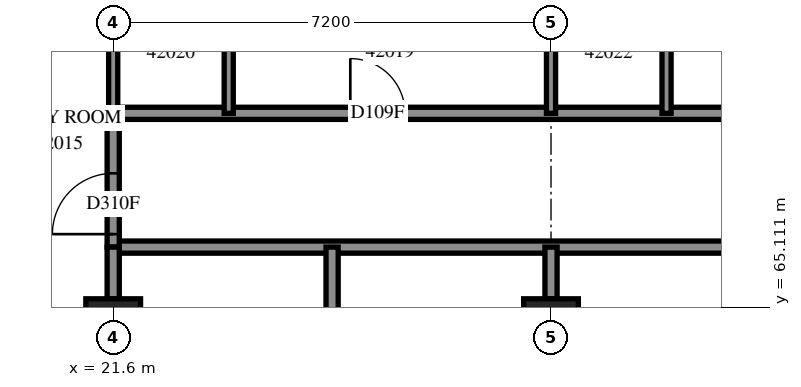
"""IFC4 building model, lengths in metres.
Left out: names, types, materials, properties, quantities, classifications, styles, units other than length and angle.
Written with IfcOpenShell. Run it as: python <this file> out.ifc"""

import sys

from ifc_helpers import new_model, si_unit, direction, frame, frame_2d, origin, origin_2d, place, context, subcontext, project, spatial, rectangle, extrude, element, fill, save


model = new_model("IFC4")
c1 = context("Model", 3, precision=1e-05, world=origin(), true_north=direction((0.0, 1.0)))
c2 = subcontext(c1, "Body", "Model", "MODEL_VIEW")
j1 = project(units=[si_unit("LENGTHUNIT", "METRE"), si_unit("PLANEANGLEUNIT", "RADIAN")], contexts=[c1])
p1 = place(None, origin())
s1 = spatial("IfcSite", under=j1, at=p1, CompositionType="ELEMENT")
p2 = place(p1, origin())
s2 = spatial("IfcBuilding", under=s1, at=p2, CompositionType="ELEMENT")
p3 = place(p2, frame((0.0, 0.0, 155.8)))
s3 = spatial("IfcBuildingStorey", under=s2, at=p3, CompositionType="ELEMENT", Elevation=155.8)
for number, where, z_axis, x_axis in (
    (1, (21.6, 64.8, 0.0), (0.0, 0.0, 1.0), (1.0, 0.0, 0.0)),
    (2, (28.8, 64.8, 0.0), (0.0, 0.0, 1.0), (1.0, 0.0, 0.0)),
):
    element("IfcColumn", number, at=place(p3, frame(where, z_axis=z_axis, x_axis=x_axis)), inside=s3, PredefinedType="COLUMN", context=c2, shape_type="SweptSolid", body=[
        extrude(rectangle(XDim=0.9, YDim=0.9, at=origin_2d()), origin(), (0.0, 0.0, 1.0), 3.1),
    ])
p4 = place(p3, frame((21.6, 68.3, 0.0), z_axis=(0.0, 0.0, 1.0), x_axis=(1.0, 0.0, 0.0)))
e3 = element("IfcWall", 3, at=p4, inside=s3, PredefinedType="PARTITIONING", context=c2, shape_type="SweptSolid", body=[
    extrude(rectangle(XDim=19.1, YDim=0.2, at=frame_2d((9.55, 0.0))), origin(), (0.0, 0.0, 1.0), 3.1),
])
p5 = place(p4, frame((3.899, 0.0, 0.0)))
e4 = element("IfcOpeningElement", 4, at=p5, cuts=e3, PredefinedType="OPENING", context=c2, shape_type="SweptSolid", body=[
    extrude(rectangle(XDim=0.9, YDim=2.1, at=frame_2d((0.45, 1.05))), frame((0.0, 0.11, 0.0), z_axis=(0.0, -1.0, 0.0), x_axis=(1.0, 0.0, 0.0)), (0.0, 0.0, 1.0), 0.22),
])
p6 = place(p4, frame((11.099, 0.0, 0.0)))
e5 = element("IfcOpeningElement", 5, at=p6, cuts=e3, PredefinedType="OPENING", context=c2, shape_type="SweptSolid", body=[
    extrude(rectangle(XDim=0.9, YDim=2.1, at=frame_2d((0.45, 1.05))), frame((0.0, 0.11, 0.0), z_axis=(0.0, -1.0, 0.0), x_axis=(1.0, 0.0, 0.0)), (0.0, 0.0, 1.0), 0.22),
])
p7 = place(p4, frame((16.7, 0.0, 0.0)))
e6 = element("IfcOpeningElement", 6, at=p7, cuts=e3, PredefinedType="OPENING", context=c2, shape_type="SweptSolid", body=[
    extrude(rectangle(XDim=0.9, YDim=2.1, at=frame_2d((0.45, 1.05))), frame((0.0, 0.11, 0.0), z_axis=(0.0, -1.0, 0.0), x_axis=(1.0, 0.0, 0.0)), (0.0, 0.0, 1.0), 0.22),
])
p8 = place(p3, frame((21.6, 66.1, 0.0), z_axis=(0.0, 0.0, 1.0), x_axis=(1.0, 0.0, 0.0)))
e7 = element("IfcWall", 7, at=p8, inside=s3, PredefinedType="PARTITIONING", context=c2, shape_type="SweptSolid", body=[
    extrude(rectangle(XDim=16.9, YDim=0.2, at=frame_2d((8.45, 0.0))), origin(), (0.0, 0.0, 1.0), 3.1),
])
p9 = place(p8, frame((12.493, 0.0, 0.0)))
e8 = element("IfcOpeningElement", 8, at=p9, cuts=e7, PredefinedType="OPENING", context=c2, shape_type="SweptSolid", body=[
    extrude(rectangle(XDim=1.0, YDim=2.1, at=frame_2d((0.5, 1.05))), frame((0.0, 0.11, 0.0), z_axis=(0.0, -1.0, 0.0), x_axis=(1.0, 0.0, 0.0)), (0.0, 0.0, 1.0), 0.22),
])
p10 = place(p3, frame((25.2, 63.018, 0.0), z_axis=(0.0, 0.0, 1.0), x_axis=(0.0, 1.0, 0.0)))
e9 = element("IfcWall", 9, at=p10, inside=s3, PredefinedType="PARTITIONING", context=c2, shape_type="SweptSolid", body=[
    extrude(rectangle(XDim=3.082, YDim=0.2, at=frame_2d((1.541, 0.0))), origin(), (0.0, 0.0, 1.0), 3.1),
])
p11 = place(p3, frame((21.6, 68.3, 0.0), z_axis=(0.0, 0.0, 1.0), x_axis=(0.0, 1.0, 0.0)))
e10 = element("IfcWall", 10, at=p11, inside=s3, PredefinedType="PARTITIONING", context=c2, shape_type="SweptSolid", body=[
    extrude(rectangle(XDim=2.4, YDim=0.15, at=frame_2d((1.2, 0.0))), origin(), (0.0, 0.0, 1.0), 2.6),
])
for number, where, z_axis, x_axis in (
    (11, (23.5, 68.3, 0.0), (0.0, 0.0, 1.0), (0.0, 1.0, 0.0)),
    (12, (28.8, 68.3, 0.0), (0.0, 0.0, 1.0), (0.0, 1.0, 0.0)),
    (13, (30.7, 68.3, 0.0), (0.0, 0.0, 1.0), (0.0, 1.0, 0.0)),
):
    element("IfcWall", number, at=place(p3, frame(where, z_axis=z_axis, x_axis=x_axis)), inside=s3, PredefinedType="PARTITIONING", context=c2, shape_type="SweptSolid", body=[
        extrude(rectangle(XDim=2.4, YDim=0.15, at=frame_2d((1.2, 0.0))), origin(), (0.0, 0.0, 1.0), 3.1),
    ])
p12 = place(p3, frame((21.6, 66.1, 0.0), z_axis=(0.0, 0.0, 1.0), x_axis=(0.0, 1.0, 0.0)))
e14 = element("IfcWall", 14, at=p12, inside=s3, PredefinedType="PARTITIONING", context=c2, shape_type="SweptSolid", body=[
    extrude(rectangle(XDim=2.2, YDim=0.2, at=frame_2d((1.1, 0.0))), origin(), (0.0, 0.0, 1.0), 2.6),
])
p13 = place(p12, frame((0.213, 0.0, 0.0)))
e15 = element("IfcOpeningElement", 15, at=p13, cuts=e14, PredefinedType="OPENING", context=c2, shape_type="SweptSolid", body=[
    extrude(rectangle(XDim=1.0, YDim=2.1, at=frame_2d((0.5, 1.05))), frame((0.0, 0.11, 0.0), z_axis=(0.0, -1.0, 0.0), x_axis=(1.0, 0.0, 0.0)), (0.0, 0.0, 1.0), 0.22),
])
p14 = place(p3, frame((21.6, 65.25, 0.0), z_axis=(0.0, 0.0, 1.0), x_axis=(0.0, 1.0, 0.0)))
e16 = element("IfcWall", 16, at=p14, inside=s3, PredefinedType="PARTITIONING", context=c2, shape_type="SweptSolid", body=[
    extrude(rectangle(XDim=0.85, YDim=0.2, at=frame_2d((0.425, 0.0))), origin(), (0.0, 0.0, 1.0), 2.6),
])
p15 = place(p3, frame((28.8, 65.25, 0.0), z_axis=(0.0, 0.0, 1.0), x_axis=(0.0, 1.0, 0.0)))
e17 = element("IfcWall", 17, at=p15, inside=s3, PredefinedType="PARTITIONING", context=c2, shape_type="SweptSolid", body=[
    extrude(rectangle(XDim=0.85, YDim=0.2, at=frame_2d((0.425, 0.0))), origin(), (0.0, 0.0, 1.0), 3.1),
])
p16 = place(p13, origin())
e18 = element("IfcDoor", 18, at=p16, inside=s3, OperationType="SINGLE_SWING_RIGHT", PredefinedType="DOOR", context=c2, shape_type="SweptSolid", body=[
    extrude(rectangle(XDim=1.0, YDim=2.1, at=frame_2d((0.5, 1.05))), frame((0.0, 0.025, 0.0), z_axis=(0.0, -1.0, 0.0), x_axis=(1.0, 0.0, 0.0)), (0.0, 0.0, 1.0), 0.05),
])
fill(e15, e18)
p17 = place(p5, origin())
e19 = element("IfcDoor", 19, at=p17, inside=s3, OperationType="SINGLE_SWING_RIGHT", PredefinedType="DOOR", context=c2, shape_type="SweptSolid", body=[
    extrude(rectangle(XDim=0.9, YDim=2.1, at=frame_2d((0.45, 1.05))), frame((0.0, 0.025, 0.0), z_axis=(0.0, -1.0, 0.0), x_axis=(1.0, 0.0, 0.0)), (0.0, 0.0, 1.0), 0.05),
])
fill(e4, e19)
save(model, sys.argv[1])
